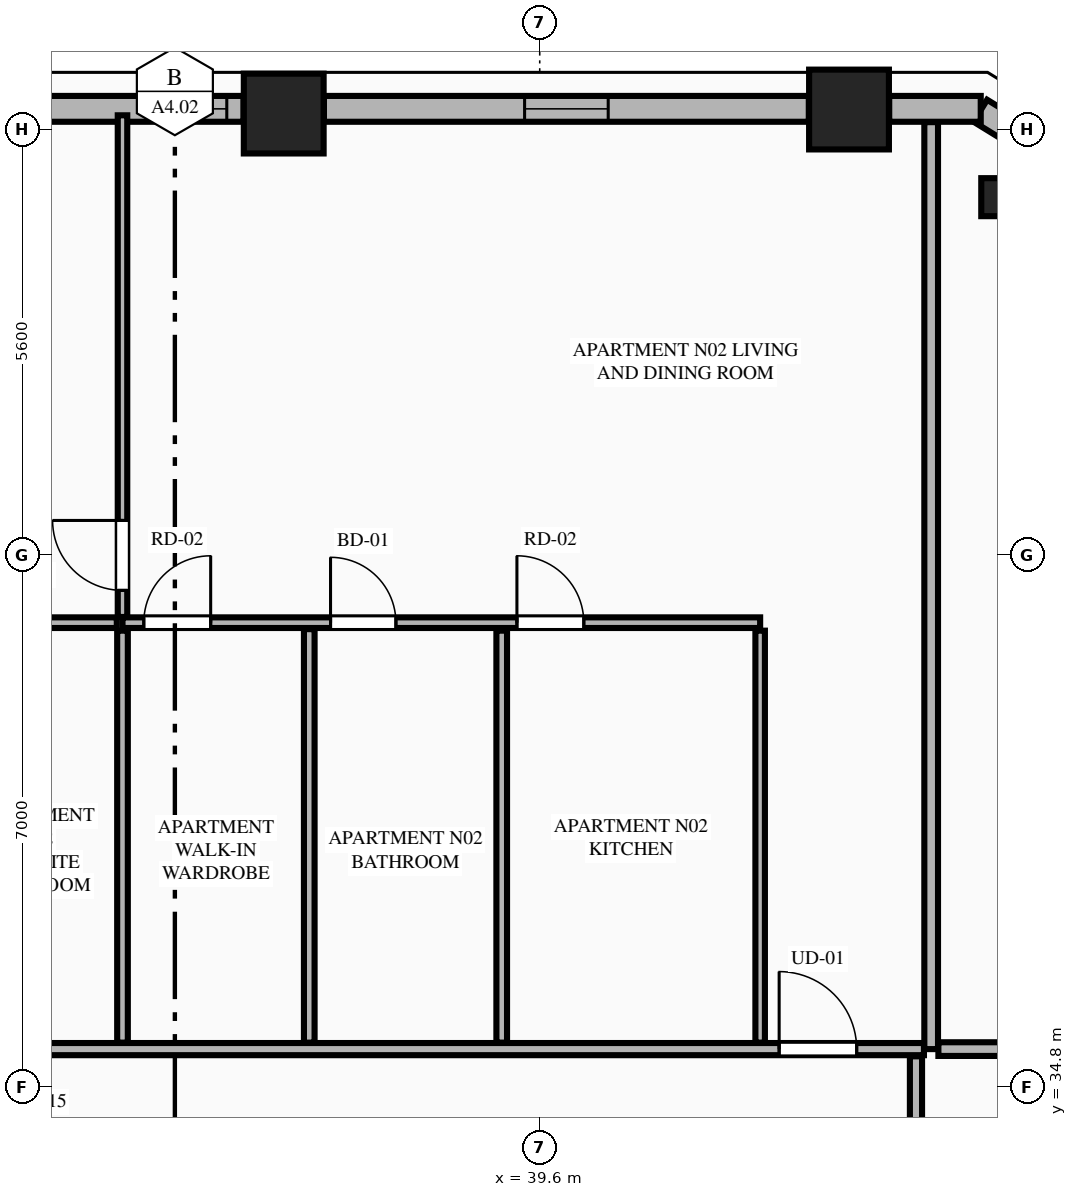
"""IFC4 building model, lengths in metres.
Left out: names, types, materials, properties, quantities, classifications, styles, units other than length and angle.
Written with IfcOpenShell. Run it as: python <this file> out.ifc"""

import sys

from ifc_helpers import new_model, si_unit, direction, frame, frame_2d, origin, origin_2d, place, context, subcontext, project, spatial, rectangle, extrude, element, fill, save


model = new_model("IFC4")
c1 = context("Model", 3, precision=1e-05, world=origin(), true_north=direction((0.0, 1.0)))
c2 = subcontext(c1, "Body", "Model", "MODEL_VIEW")
j1 = project(units=[si_unit("LENGTHUNIT", "METRE"), si_unit("PLANEANGLEUNIT", "RADIAN")], contexts=[c1])
p1 = place(None, origin())
s1 = spatial("IfcSite", under=j1, at=p1, CompositionType="ELEMENT")
p2 = place(p1, origin())
s2 = spatial("IfcBuilding", under=s1, at=p2, CompositionType="ELEMENT")
p3 = place(p2, frame((0.0, 0.0, 105.5)))
s3 = spatial("IfcBuildingStorey", under=s2, at=p3, CompositionType="ELEMENT", Elevation=105.5)
for number, where, z_axis, x_axis in (
    (1, (43.669, 47.661, 0.0), (0.0, 0.0, 1.0), (1.0, 0.0, 0.0)),
    (2, (36.232, 47.608, 0.0), (0.0, 0.0, 1.0), (1.0, 0.0, 0.0)),
):
    element("IfcColumn", number, at=place(p3, frame(where, z_axis=z_axis, x_axis=x_axis)), inside=s3, PredefinedType="COLUMN", context=c2, shape_type="SweptSolid", body=[
        extrude(rectangle(XDim=1.05, YDim=1.05, at=origin_2d()), origin(), (0.0, 0.0, 1.0), 3.55),
    ])
p4 = place(p3, frame((45.659, 46.508, 0.0), z_axis=(0.0, 0.0, 1.0), x_axis=(-0.865160173452, 0.501495637342, 0.0)))
e3 = element("IfcColumn", 3, at=p4, inside=s3, PredefinedType="PILASTER", context=c2, shape_type="SweptSolid", body=[
    extrude(rectangle(XDim=0.5, YDim=0.35, at=origin_2d()), origin(), (0.0, 0.0, 1.0), 3.55),
])
p5 = place(p3, frame((46.971, 46.677, 0.0), z_axis=(0.0, 0.0, 1.0), x_axis=(-0.851798915137, 0.523868884523, 0.0)))
e4 = element("IfcWall", 4, at=p5, inside=s3, PredefinedType="STANDARD", context=c2, shape_type="SweptSolid", body=[
    extrude(rectangle(XDim=1.848, YDim=0.34, at=frame_2d((0.924, 0.0))), origin(), (0.0, 0.0, 1.0), 3.34),
])
p6 = place(p3, frame((45.402, 47.67, 0.0), z_axis=(0.0, 0.0, 1.0), x_axis=(-1.0, 0.0, 0.0)))
e5 = element("IfcWall", 5, at=p6, inside=s3, PredefinedType="STANDARD", context=c2, shape_type="SweptSolid", body=[
    extrude(rectangle(XDim=1.204, YDim=0.34, at=frame_2d((0.602, 0.0))), origin(), (0.0, 0.0, 1.0), 3.34),
])
p7 = place(p3, frame((43.14, 47.67, 0.0), z_axis=(0.0, 0.0, 1.0), x_axis=(-1.0, 0.0, 0.0)))
e6 = element("IfcWall", 6, at=p7, inside=s3, PredefinedType="STANDARD", context=c2, shape_type="SweptSolid", body=[
    extrude(rectangle(XDim=6.379, YDim=0.34, at=frame_2d((3.189, 0.0))), origin(), (0.0, 0.0, 1.0), 2.797),
])
p8 = place(p7, frame((2.639, 0.0, 0.75)))
e7 = element("IfcOpeningElement", 7, at=p8, cuts=e6, PredefinedType="OPENING", context=c2, shape_type="SweptSolid", body=[
    extrude(rectangle(XDim=1.1, YDim=1.897, at=frame_2d((0.55, 0.948))), frame((0.0, 0.18, 0.0), z_axis=(0.0, -1.0, 0.0), x_axis=(1.0, 0.0, 0.0)), (0.0, 0.0, 1.0), 0.36),
])
p9 = place(p3, frame((35.703, 47.67, 0.0), z_axis=(0.0, 0.0, 1.0), x_axis=(-1.0, 0.0, 0.0)))
e8 = element("IfcWall", 8, at=p9, inside=s3, PredefinedType="STANDARD", context=c2, shape_type="SweptSolid", body=[
    extrude(rectangle(XDim=6.606, YDim=0.34, at=frame_2d((3.303, 0.0))), origin(), (0.0, 0.0, 1.0), 2.797),
])
p10 = place(p9, frame((0.22, 0.0, 0.75)))
e9 = element("IfcOpeningElement", 9, at=p10, cuts=e8, PredefinedType="OPENING", context=c2, shape_type="SweptSolid", body=[
    extrude(rectangle(XDim=1.04, YDim=1.897, at=frame_2d((0.52, 0.948))), frame((0.0, 0.18, 0.0), z_axis=(0.0, -1.0, 0.0), x_axis=(1.0, 0.0, 0.0)), (0.0, 0.0, 1.0), 0.36),
])
p11 = place(p9, frame((3.605, 0.0, 0.75)))
e10 = element("IfcOpeningElement", 10, at=p11, cuts=e8, PredefinedType="OPENING", context=c2, shape_type="SweptSolid", body=[
    extrude(rectangle(XDim=1.1, YDim=1.897, at=frame_2d((0.55, 0.948))), frame((0.0, 0.18, 0.0), z_axis=(0.0, -1.0, 0.0), x_axis=(1.0, 0.0, 0.0)), (0.0, 0.0, 1.0), 0.36),
])
p12 = place(p3, frame((44.75, 35.3, 0.0), z_axis=(0.0, 0.0, 1.0), x_axis=(0.0, 1.0, 0.0)))
e11 = element("IfcWall", 11, at=p12, inside=s3, PredefinedType="PARTITIONING", context=c2, shape_type="SweptSolid", body=[
    extrude(rectangle(XDim=12.195, YDim=0.18, at=frame_2d((6.098, 0.0))), origin(), (0.0, 0.0, 1.0), 3.34),
])
p13 = place(p3, frame((28.663, 35.3, 0.0), z_axis=(0.0, 0.0, 1.0), x_axis=(1.0, 0.0, 0.0)))
e12 = element("IfcWall", 12, at=p13, inside=s3, PredefinedType="PARTITIONING", context=c2, shape_type="SweptSolid", body=[
    extrude(rectangle(XDim=15.992, YDim=0.16, at=frame_2d((7.996, 0.0))), origin(), (0.0, 0.0, 1.0), 3.34),
])
p14 = place(p13, frame((14.087, 0.0, 0.0)))
e13 = element("IfcOpeningElement", 13, at=p14, cuts=e12, PredefinedType="OPENING", context=c2, shape_type="SweptSolid", body=[
    extrude(rectangle(XDim=1.02, YDim=2.25, at=frame_2d((0.51, 1.125))), frame((0.0, 0.09, 0.0), z_axis=(0.0, -1.0, 0.0), x_axis=(1.0, 0.0, 0.0)), (0.0, 0.0, 1.0), 0.18),
])
p15 = place(p3, frame((42.5, 35.385, 0.0), z_axis=(0.0, 0.0, 1.0), x_axis=(0.0, 1.0, 0.0)))
e14 = element("IfcWall", 14, at=p15, inside=s3, PredefinedType="PARTITIONING", context=c2, shape_type="SweptSolid", body=[
    extrude(rectangle(XDim=5.42, YDim=0.125, at=frame_2d((2.71, 0.0))), origin(), (0.0, 0.0, 1.0), 2.722),
])
p16 = place(p3, frame((34.111, 40.91, 0.0), z_axis=(0.0, 0.0, 1.0), x_axis=(1.0, 0.0, 0.0)))
e15 = element("IfcWall", 15, at=p16, inside=s3, PredefinedType="PLUMBINGWALL", context=c2, shape_type="SweptSolid", body=[
    extrude(rectangle(XDim=8.389, YDim=0.14, at=frame_2d((4.194, 0.0))), origin(), (0.0, 0.0, 1.0), 3.34),
])
p17 = place(p16, frame((0.28, 0.0, 0.0)))
e16 = element("IfcOpeningElement", 16, at=p17, cuts=e15, PredefinedType="OPENING", context=c2, shape_type="SweptSolid", body=[
    extrude(rectangle(XDim=0.88, YDim=2.15, at=frame_2d((0.44, 1.075))), frame((0.0, 0.08, 0.0), z_axis=(0.0, -1.0, 0.0), x_axis=(1.0, 0.0, 0.0)), (0.0, 0.0, 1.0), 0.16),
])
p18 = place(p16, frame((2.737, 0.0, 0.0)))
e17 = element("IfcOpeningElement", 17, at=p18, cuts=e15, PredefinedType="OPENING", context=c2, shape_type="SweptSolid", body=[
    extrude(rectangle(XDim=0.86, YDim=2.1, at=frame_2d((0.43, 1.05))), frame((0.0, 0.08, 0.0), z_axis=(0.0, -1.0, 0.0), x_axis=(1.0, 0.0, 0.0)), (0.0, 0.0, 1.0), 0.16),
])
p19 = place(p16, frame((5.189, 0.0, 0.0)))
e18 = element("IfcOpeningElement", 18, at=p19, cuts=e15, PredefinedType="OPENING", context=c2, shape_type="SweptSolid", body=[
    extrude(rectangle(XDim=0.88, YDim=2.15, at=frame_2d((0.44, 1.075))), frame((0.0, 0.08, 0.0), z_axis=(0.0, -1.0, 0.0), x_axis=(1.0, 0.0, 0.0)), (0.0, 0.0, 1.0), 0.16),
])
p20 = place(p3, frame((28.663, 40.91, 0.0), z_axis=(0.0, 0.0, 1.0), x_axis=(1.0, 0.0, 0.0)))
e19 = element("IfcWall", 19, at=p20, inside=s3, PredefinedType="PLUMBINGWALL", context=c2, shape_type="SweptSolid", body=[
    extrude(rectangle(XDim=5.373, YDim=0.14, at=frame_2d((2.687, 0.0))), origin(), (0.0, 0.0, 1.0), 3.34),
])
p21 = place(p20, frame((0.28, 0.0, 0.0)))
e20 = element("IfcOpeningElement", 20, at=p21, cuts=e19, PredefinedType="OPENING", context=c2, shape_type="SweptSolid", body=[
    extrude(rectangle(XDim=0.88, YDim=2.15, at=frame_2d((0.44, 1.075))), frame((0.0, 0.08, 0.0), z_axis=(0.0, -1.0, 0.0), x_axis=(1.0, 0.0, 0.0)), (0.0, 0.0, 1.0), 0.16),
])
p22 = place(p20, frame((3.543, 0.0, 0.0)))
e21 = element("IfcOpeningElement", 21, at=p22, cuts=e19, PredefinedType="OPENING", context=c2, shape_type="SweptSolid", body=[
    extrude(rectangle(XDim=0.86, YDim=2.1, at=frame_2d((0.43, 1.05))), frame((0.0, 0.08, 0.0), z_axis=(0.0, -1.0, 0.0), x_axis=(1.0, 0.0, 0.0)), (0.0, 0.0, 1.0), 0.16),
])
for number, where, z_axis, x_axis in (
    (22, (39.1, 35.385, 0.0), (0.0, 0.0, 1.0), (0.0, 1.0, 0.0)),
    (23, (34.111, 35.385, 0.0), (0.0, 0.0, 1.0), (0.0, 1.0, 0.0)),
):
    element("IfcWall", number, at=place(p3, frame(where, z_axis=z_axis, x_axis=x_axis)), inside=s3, PredefinedType="PLUMBINGWALL", context=c2, shape_type="SweptSolid", body=[
        extrude(rectangle(XDim=5.42, YDim=0.14, at=frame_2d((2.71, 0.0))), origin(), (0.0, 0.0, 1.0), 3.34),
    ])
p23 = place(p3, frame((34.111, 40.985, 0.0), z_axis=(0.0, 0.0, 1.0), x_axis=(0.0, 1.0, 0.0)))
e24 = element("IfcWall", 24, at=p23, inside=s3, PredefinedType="PARTITIONING", context=c2, shape_type="SweptSolid", body=[
    extrude(rectangle(XDim=6.6, YDim=0.125, at=frame_2d((3.3, 0.0))), origin(), (0.0, 0.0, 1.0), 3.34),
])
p24 = place(p23, frame((0.35, 0.0, 0.0)))
e25 = element("IfcOpeningElement", 25, at=p24, cuts=e24, PredefinedType="OPENING", context=c2, shape_type="SweptSolid", body=[
    extrude(rectangle(XDim=0.92, YDim=2.15, at=frame_2d((0.46, 1.075))), frame((0.0, 0.073, 0.0), z_axis=(0.0, -1.0, 0.0), x_axis=(1.0, 0.0, 0.0)), (0.0, 0.0, 1.0), 0.145),
])
p25 = place(p3, frame((36.568, 35.385, 0.0), z_axis=(0.0, 0.0, 1.0), x_axis=(0.0, 1.0, 0.0)))
e26 = element("IfcWall", 26, at=p25, inside=s3, PredefinedType="PLUMBINGWALL", context=c2, shape_type="SweptSolid", body=[
    extrude(rectangle(XDim=5.44, YDim=0.14, at=frame_2d((2.72, 0.0))), origin(), (0.0, 0.0, 1.0), 3.34),
])
p26 = place(p3, frame((44.845, 35.3, 0.0), z_axis=(0.0, 0.0, 1.0), x_axis=(1.0, 0.0, 0.0)))
e27 = element("IfcWall", 27, at=p26, inside=s3, PredefinedType="PARTITIONING", context=c2, shape_type="SweptSolid", body=[
    extrude(rectangle(XDim=7.669, YDim=0.18, at=frame_2d((3.834, 0.0))), origin(), (0.0, 0.0, 1.0), 3.34),
])
p27 = place(p3, frame((44.55, 26.371, 0.0), z_axis=(0.0, 0.0, 1.0), x_axis=(0.0, 1.0, 0.0)))
e28 = element("IfcWall", 28, at=p27, inside=s3, PredefinedType="PARTITIONING", context=c2, shape_type="SweptSolid", body=[
    extrude(rectangle(XDim=8.834, YDim=0.16, at=frame_2d((4.417, 0.0))), origin(), (0.0, 0.0, 1.0), 3.34),
])
p28 = place(p27, frame((0.45, 0.0, 0.0)))
e29 = element("IfcOpeningElement", 29, at=p28, cuts=e28, PredefinedType="OPENING", context=c2, shape_type="SweptSolid", body=[
    extrude(rectangle(XDim=1.02, YDim=2.25, at=frame_2d((0.51, 1.125))), frame((0.0, 0.09, 0.0), z_axis=(0.0, -1.0, 0.0), x_axis=(1.0, 0.0, 0.0)), (0.0, 0.0, 1.0), 0.18),
])
p29 = place(p8, origin())
e30 = element("IfcWindow", 30, at=p29, inside=s3, PartitioningType="SINGLE_PANEL", PredefinedType="WINDOW", context=c2, shape_type="SweptSolid", body=[
    extrude(rectangle(XDim=1.1, YDim=1.897, at=frame_2d((0.55, 0.948))), frame((0.0, 0.03, 0.0), z_axis=(0.0, -1.0, 0.0), x_axis=(1.0, 0.0, 0.0)), (0.0, 0.0, 1.0), 0.06),
])
fill(e7, e30)
p30 = place(p10, origin())
e31 = element("IfcWindow", 31, at=p30, inside=s3, PartitioningType="SINGLE_PANEL", PredefinedType="WINDOW", context=c2, shape_type="SweptSolid", body=[
    extrude(rectangle(XDim=1.04, YDim=1.897, at=frame_2d((0.52, 0.948))), frame((0.0, 0.03, 0.0), z_axis=(0.0, -1.0, 0.0), x_axis=(1.0, 0.0, 0.0)), (0.0, 0.0, 1.0), 0.06),
])
fill(e9, e31)
p31 = place(p17, origin())
e32 = element("IfcDoor", 32, at=p31, inside=s3, OperationType="SINGLE_SWING_RIGHT", PredefinedType="DOOR", context=c2, shape_type="SweptSolid", body=[
    extrude(rectangle(XDim=0.88, YDim=2.15, at=frame_2d((0.44, 1.075))), frame((0.0, 0.025, 0.0), z_axis=(0.0, -1.0, 0.0), x_axis=(1.0, 0.0, 0.0)), (0.0, 0.0, 1.0), 0.05),
])
fill(e16, e32)
p32 = place(p18, origin())
e33 = element("IfcDoor", 33, at=p32, inside=s3, OperationType="SINGLE_SWING_LEFT", PredefinedType="DOOR", context=c2, shape_type="SweptSolid", body=[
    extrude(rectangle(XDim=0.86, YDim=2.1, at=frame_2d((0.43, 1.05))), frame((0.0, 0.025, 0.0), z_axis=(0.0, -1.0, 0.0), x_axis=(1.0, 0.0, 0.0)), (0.0, 0.0, 1.0), 0.05),
])
fill(e17, e33)
p33 = place(p14, origin())
e34 = element("IfcDoor", 34, at=p33, inside=s3, OperationType="SINGLE_SWING_LEFT", PredefinedType="DOOR", context=c2, shape_type="SweptSolid", body=[
    extrude(rectangle(XDim=1.02, YDim=2.25, at=frame_2d((0.51, 1.125))), frame((0.0, 0.025, 0.0), z_axis=(0.0, -1.0, 0.0), x_axis=(1.0, 0.0, 0.0)), (0.0, 0.0, 1.0), 0.05),
])
fill(e13, e34)
p34 = place(p19, origin())
e35 = element("IfcDoor", 35, at=p34, inside=s3, OperationType="SINGLE_SWING_LEFT", PredefinedType="DOOR", context=c2, shape_type="SweptSolid", body=[
    extrude(rectangle(XDim=0.88, YDim=2.15, at=frame_2d((0.44, 1.075))), frame((0.0, 0.025, 0.0), z_axis=(0.0, -1.0, 0.0), x_axis=(1.0, 0.0, 0.0)), (0.0, 0.0, 1.0), 0.05),
])
fill(e18, e35)
p35 = place(p24, origin())
e36 = element("IfcDoor", 36, at=p35, inside=s3, OperationType="SINGLE_SWING_RIGHT", PredefinedType="DOOR", context=c2, shape_type="SweptSolid", body=[
    extrude(rectangle(XDim=0.92, YDim=2.15, at=frame_2d((0.46, 1.075))), frame((0.0, 0.025, 0.0), z_axis=(0.0, -1.0, 0.0), x_axis=(1.0, 0.0, 0.0)), (0.0, 0.0, 1.0), 0.05),
])
fill(e25, e36)
save(model, sys.argv[1])
